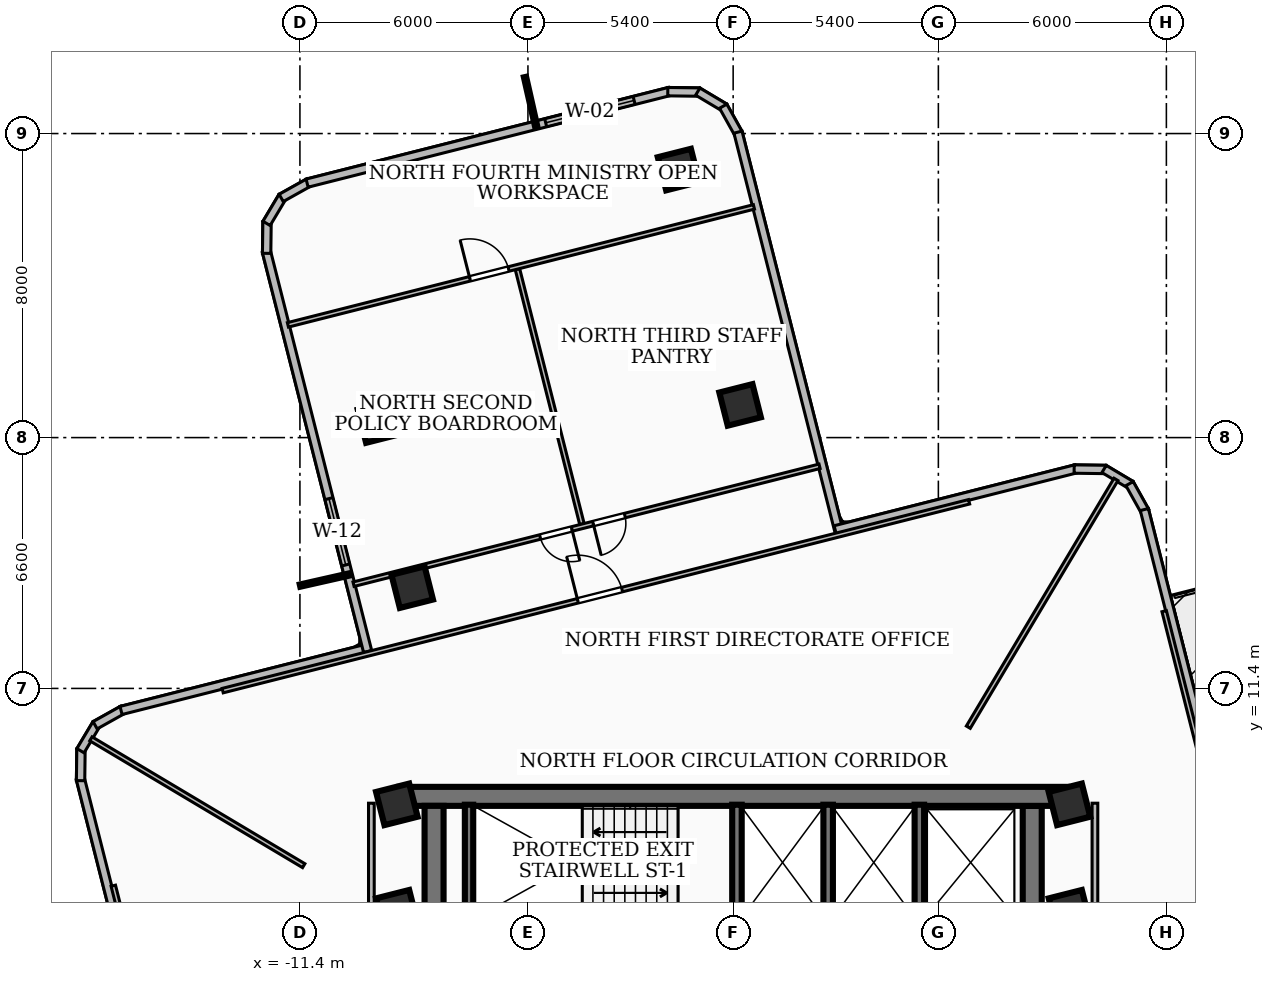
"""IFC4 building model, lengths in metres.
Left out: names, types, materials, properties, quantities, classifications, styles, units other than length and angle.
Written with IfcOpenShell. Run it as: python <this file> out.ifc"""

import sys

from ifc_helpers import new_model, si_unit, direction, frame, frame_2d, origin, origin_2d, place, context, subcontext, project, spatial, rectangle, extrude, element, fill, save


model = new_model("IFC4")
c1 = context("Model", 3, precision=1e-05, world=origin(), true_north=direction((0.0, 1.0)))
c2 = subcontext(c1, "Body", "Model", "MODEL_VIEW")
j1 = project(units=[si_unit("LENGTHUNIT", "METRE"), si_unit("PLANEANGLEUNIT", "RADIAN")], contexts=[c1])
p1 = place(None, origin())
s1 = spatial("IfcSite", under=j1, at=p1, CompositionType="ELEMENT")
p2 = place(p1, origin())
s2 = spatial("IfcBuilding", under=s1, at=p2, CompositionType="ELEMENT")
p3 = place(p2, frame((0.0, 0.0, 130.68)))
s3 = spatial("IfcBuildingStorey", under=s2, at=p3, CompositionType="ELEMENT", Elevation=130.68)
p4 = place(p3, frame((-8.78, 8.56, 0.0), z_axis=(0.0, 0.0, 1.0), x_axis=(1.0, 0.0, 0.0)))
e1 = element("IfcWall", 1, at=p4, inside=s3, PredefinedType="SHEAR", context=c2, shape_type="SweptSolid", body=[
    extrude(rectangle(XDim=17.56, YDim=0.5, at=frame_2d((8.78, 0.0))), origin(), (0.0, 0.0, 1.0), 3.32),
])
for number, where, z_axis, x_axis in (
    (2, (-7.87, 2.0, 0.0), (0.0, 0.0, 1.0), (0.0, 1.0, 0.0)),
    (3, (7.87, 8.31, 0.0), (0.0, 0.0, 1.0), (0.0, -1.0, 0.0)),
):
    element("IfcWall", number, at=place(p3, frame(where, z_axis=z_axis, x_axis=x_axis)), inside=s3, PredefinedType="SHEAR", context=c2, shape_type="SweptSolid", body=[
        extrude(rectangle(XDim=6.31, YDim=0.5, at=frame_2d((3.155, 0.0))), origin(), (0.0, 0.0, 1.0), 3.32),
    ])
p5 = place(p3, frame((-6.95, 5.28, 0.0), z_axis=(0.0, 0.0, 1.0), x_axis=(0.0, 1.0, 0.0)))
e4 = element("IfcWall", 4, at=p5, inside=s3, PredefinedType="SOLIDWALL", context=c2, shape_type="SweptSolid", body=[
    extrude(rectangle(XDim=3.06, YDim=0.22, at=frame_2d((1.53, 0.0))), origin(), (0.0, 0.0, 1.0), 3.32),
])
for number, where, z_axis, x_axis in (
    (5, (0.1, 5.3, 0.0), (0.0, 0.0, 1.0), (0.0, 1.0, 0.0)),
    (6, (2.5, 5.3, 0.0), (0.0, 0.0, 1.0), (0.0, 1.0, 0.0)),
    (7, (4.9, 5.3, 0.0), (0.0, 0.0, 1.0), (0.0, 1.0, 0.0)),
):
    element("IfcWall", number, at=place(p3, frame(where, z_axis=z_axis, x_axis=x_axis)), inside=s3, PredefinedType="SOLIDWALL", context=c2, shape_type="SweptSolid", body=[
        extrude(rectangle(XDim=3.04, YDim=0.25, at=frame_2d((1.52, 0.0))), origin(), (0.0, 0.0, 1.0), 3.32),
    ])
for number, where, z_axis, x_axis in (
    (8, (-8.85, 5.55, 0.0), (0.0, 0.0, 1.0), (0.969, 0.245, 0.0)),
    (9, (8.85, 5.55, 0.0), (0.0, 0.0, 1.0), (0.969, 0.245, 0.0)),
    (10, (-8.85, 8.35, 0.0), (0.0, 0.0, 1.0), (0.969, 0.245, 0.0)),
    (11, (8.85, 8.35, 0.0), (0.0, 0.0, 1.0), (0.969, 0.245, 0.0)),
    (12, (0.183, 18.86, 0.0), (0.0, 0.0, 1.0), (0.969, 0.245, 0.0)),
    (13, (-8.445, 14.064, 0.0), (0.0, 0.0, 1.0), (0.969, 0.245, 0.0)),
    (14, (-1.437, 25.052, 0.0), (0.0, 0.0, 1.0), (0.969, 0.245, 0.0)),
    (15, (-9.333, 18.409, 0.0), (0.0, 0.0, 1.0), (0.969, 0.245, 0.0)),
):
    element("IfcColumn", number, at=place(p3, frame(where, z_axis=z_axis, x_axis=x_axis)), inside=s3, PredefinedType="COLUMN", context=c2, shape_type="SweptSolid", body=[
        extrude(rectangle(XDim=0.9, YDim=0.9, at=origin_2d()), origin(), (0.0, 0.0, 1.0), 3.6),
    ])
p6 = place(p3, frame((-15.574, 2.684, 0.0), z_axis=(0.0, 0.0, 1.0), x_axis=(-0.245346347134, 0.969435490349, 0.0)))
e16 = element("IfcWall", 16, at=p6, inside=s3, PredefinedType="SOLIDWALL", context=c2, shape_type="SweptSolid", body=[
    extrude(rectangle(XDim=6.538, YDim=0.22, at=frame_2d((3.269, 0.0))), origin(), (0.0, 0.0, 1.0), 3.32),
])
p7 = place(p3, frame((-17.172, 8.973, 0.0), z_axis=(0.0, 0.0, 1.0), x_axis=(0.013464821393, 0.999909345183, 0.0)))
e17 = element("IfcWall", 17, at=p7, inside=s3, PredefinedType="SOLIDWALL", context=c2, shape_type="SweptSolid", body=[
    extrude(rectangle(XDim=0.834, YDim=0.22, at=frame_2d((0.417, 0.0))), origin(), (0.0, 0.0, 1.0), 3.32),
])
p8 = place(p3, frame((-17.174, 9.761, 0.0), z_axis=(0.0, 0.0, 1.0), x_axis=(0.512960801038, 0.858412031951, 0.0)))
e18 = element("IfcWall", 18, at=p8, inside=s3, PredefinedType="SOLIDWALL", context=c2, shape_type="SweptSolid", body=[
    extrude(rectangle(XDim=0.819, YDim=0.22, at=frame_2d((0.41, 0.0))), origin(), (0.0, 0.0, 1.0), 3.32),
])
p9 = place(p3, frame((-16.789, 10.431, 0.0), z_axis=(0.0, 0.0, 1.0), x_axis=(0.872870149311, 0.487952561671, 0.0)))
e19 = element("IfcWall", 19, at=p9, inside=s3, PredefinedType="SOLIDWALL", context=c2, shape_type="SweptSolid", body=[
    extrude(rectangle(XDim=0.834, YDim=0.22, at=frame_2d((0.417, 0.0))), origin(), (0.0, 0.0, 1.0), 3.32),
])
p10 = place(p3, frame((-16.107, 10.82, 0.0), z_axis=(0.0, 0.0, 1.0), x_axis=(0.969443674581, 0.245314006561, 0.0)))
e20 = element("IfcWall", 20, at=p10, inside=s3, PredefinedType="SOLIDWALL", context=c2, shape_type="SweptSolid", body=[
    extrude(rectangle(XDim=6.759, YDim=0.22, at=frame_2d((3.379, 0.0))), origin(), (0.0, 0.0, 1.0), 3.32),
])
p11 = place(p3, frame((-9.618, 12.371, 0.0), z_axis=(0.0, 0.0, 1.0), x_axis=(-0.245359810912, 0.969432082814, 0.0)))
e21 = element("IfcWall", 21, at=p11, inside=s3, PredefinedType="SOLIDWALL", context=c2, shape_type="SweptSolid", body=[
    extrude(rectangle(XDim=10.858, YDim=0.22, at=frame_2d((5.429, 0.0))), origin(), (0.0, 0.0, 1.0), 3.32),
])
p12 = place(p11, frame((2.35, 0.0, 0.85)))
e22 = element("IfcOpeningElement", 22, at=p12, cuts=e21, PredefinedType="OPENING", context=c2, shape_type="SweptSolid", body=[
    extrude(rectangle(XDim=1.8, YDim=1.6, at=frame_2d((0.9, 0.8))), frame((0.0, 0.12, 0.0), z_axis=(0.0, -1.0, 0.0), x_axis=(1.0, 0.0, 0.0)), (0.0, 0.0, 1.0), 0.24),
])
p13 = place(p3, frame((-12.276, 22.848, 0.0), z_axis=(0.0, 0.0, 1.0), x_axis=(0.013172159236, 0.999913243347, 0.0)))
e23 = element("IfcWall", 23, at=p13, inside=s3, PredefinedType="SOLIDWALL", context=c2, shape_type="SweptSolid", body=[
    extrude(rectangle(XDim=0.834, YDim=0.22, at=frame_2d((0.417, 0.0))), origin(), (0.0, 0.0, 1.0), 3.32),
])
p14 = place(p3, frame((-12.278, 23.636, 0.0), z_axis=(0.0, 0.0, 1.0), x_axis=(0.512960801038, 0.858412031951, 0.0)))
e24 = element("IfcWall", 24, at=p14, inside=s3, PredefinedType="SOLIDWALL", context=c2, shape_type="SweptSolid", body=[
    extrude(rectangle(XDim=0.819, YDim=0.22, at=frame_2d((0.41, 0.0))), origin(), (0.0, 0.0, 1.0), 3.32),
])
p15 = place(p3, frame((-11.893, 24.306, 0.0), z_axis=(0.0, 0.0, 1.0), x_axis=(0.872870149311, 0.487952561671, 0.0)))
e25 = element("IfcWall", 25, at=p15, inside=s3, PredefinedType="SOLIDWALL", context=c2, shape_type="SweptSolid", body=[
    extrude(rectangle(XDim=0.834, YDim=0.22, at=frame_2d((0.417, 0.0))), origin(), (0.0, 0.0, 1.0), 3.32),
])
p16 = place(p3, frame((-11.211, 24.695, 0.0), z_axis=(0.0, 0.0, 1.0), x_axis=(0.969473357826, 0.245196673032, 0.0)))
e26 = element("IfcWall", 26, at=p16, inside=s3, PredefinedType="SOLIDWALL", context=c2, shape_type="SweptSolid", body=[
    extrude(rectangle(XDim=9.84, YDim=0.22, at=frame_2d((4.92, 0.0))), origin(), (0.0, 0.0, 1.0), 3.32),
])
p17 = place(p16, frame((6.476, 0.0, 0.85)))
e27 = element("IfcOpeningElement", 27, at=p17, cuts=e26, PredefinedType="OPENING", context=c2, shape_type="SweptSolid", body=[
    extrude(rectangle(XDim=2.4, YDim=2.1, at=frame_2d((1.2, 1.05))), frame((0.0, 0.12, 0.0), z_axis=(0.0, -1.0, 0.0), x_axis=(1.0, 0.0, 0.0)), (0.0, 0.0, 1.0), 0.24),
])
p18 = place(p3, frame((-1.72, 27.102, 0.0), z_axis=(0.0, 0.0, 1.0), x_axis=(0.999913446142, -0.01315675587, 0.0)))
e28 = element("IfcWall", 28, at=p18, inside=s3, PredefinedType="SOLIDWALL", context=c2, shape_type="SweptSolid", body=[
    extrude(rectangle(XDim=0.835, YDim=0.22, at=frame_2d((0.417, 0.0))), origin(), (0.0, 0.0, 1.0), 3.32),
])
p19 = place(p3, frame((-0.931, 27.104, 0.0), z_axis=(0.0, 0.0, 1.0), x_axis=(0.858676543827, -0.512517895376, 0.0)))
e29 = element("IfcWall", 29, at=p19, inside=s3, PredefinedType="SOLIDWALL", context=c2, shape_type="SweptSolid", body=[
    extrude(rectangle(XDim=0.817, YDim=0.22, at=frame_2d((0.409, 0.0))), origin(), (0.0, 0.0, 1.0), 3.32),
])
p20 = place(p3, frame((-0.262, 26.72, 0.0), z_axis=(0.0, 0.0, 1.0), x_axis=(0.487454303052, -0.873148499647, 0.0)))
e30 = element("IfcWall", 30, at=p20, inside=s3, PredefinedType="SOLIDWALL", context=c2, shape_type="SweptSolid", body=[
    extrude(rectangle(XDim=0.835, YDim=0.22, at=frame_2d((0.417, 0.0))), origin(), (0.0, 0.0, 1.0), 3.32),
])
p21 = place(p3, frame((0.127, 26.037, 0.0), z_axis=(0.0, 0.0, 1.0), x_axis=(0.245354462674, -0.969433436418, 0.0)))
e31 = element("IfcWall", 31, at=p21, inside=s3, PredefinedType="SOLIDWALL", context=c2, shape_type="SweptSolid", body=[
    extrude(rectangle(XDim=10.858, YDim=0.22, at=frame_2d((5.429, 0.0))), origin(), (0.0, 0.0, 1.0), 2.55),
])
p22 = place(p3, frame((2.684, 15.574, 0.0), z_axis=(0.0, 0.0, 1.0), x_axis=(0.969435490349, 0.245346347134, 0.0)))
e32 = element("IfcWall", 32, at=p22, inside=s3, PredefinedType="SOLIDWALL", context=c2, shape_type="SweptSolid", body=[
    extrude(rectangle(XDim=6.538, YDim=0.22, at=frame_2d((3.269, 0.0))), origin(), (0.0, 0.0, 1.0), 2.55),
])
p23 = place(p3, frame((8.973, 17.172, 0.0), z_axis=(0.0, 0.0, 1.0), x_axis=(0.999909345183, -0.013464821393, 0.0)))
e33 = element("IfcWall", 33, at=p23, inside=s3, PredefinedType="SOLIDWALL", context=c2, shape_type="SweptSolid", body=[
    extrude(rectangle(XDim=0.834, YDim=0.22, at=frame_2d((0.417, 0.0))), origin(), (0.0, 0.0, 1.0), 3.32),
])
p24 = place(p3, frame((9.761, 17.174, 0.0), z_axis=(0.0, 0.0, 1.0), x_axis=(0.858412031951, -0.512960801038, 0.0)))
e34 = element("IfcWall", 34, at=p24, inside=s3, PredefinedType="SOLIDWALL", context=c2, shape_type="SweptSolid", body=[
    extrude(rectangle(XDim=0.819, YDim=0.22, at=frame_2d((0.41, 0.0))), origin(), (0.0, 0.0, 1.0), 3.32),
])
p25 = place(p3, frame((10.431, 16.789, 0.0), z_axis=(0.0, 0.0, 1.0), x_axis=(0.487952561671, -0.872870149311, 0.0)))
e35 = element("IfcWall", 35, at=p25, inside=s3, PredefinedType="SOLIDWALL", context=c2, shape_type="SweptSolid", body=[
    extrude(rectangle(XDim=0.834, YDim=0.22, at=frame_2d((0.417, 0.0))), origin(), (0.0, 0.0, 1.0), 3.32),
])
p26 = place(p3, frame((10.82, 16.107, 0.0), z_axis=(0.0, 0.0, 1.0), x_axis=(0.245314006561, -0.969443674581, 0.0)))
e36 = element("IfcWall", 36, at=p26, inside=s3, PredefinedType="SOLIDWALL", context=c2, shape_type="SweptSolid", body=[
    extrude(rectangle(XDim=6.759, YDim=0.22, at=frame_2d((3.379, 0.0))), origin(), (0.0, 0.0, 1.0), 3.32),
])
for number, where, z_axis, x_axis in (
    (37, (-9.52, 1.75, 0.0), (0.0, 0.0, 1.0), (0.0, 1.0, 0.0)),
    (38, (9.52, 1.75, 0.0), (0.0, 0.0, 1.0), (0.0, 1.0, 0.0)),
):
    element("IfcWall", number, at=place(p3, frame(where, z_axis=z_axis, x_axis=x_axis)), inside=s3, PredefinedType="PARTITIONING", context=c2, shape_type="SweptSolid", body=[
        extrude(rectangle(XDim=6.63, YDim=0.15, at=frame_2d((3.315, 0.0))), origin(), (0.0, 0.0, 1.0), 2.55),
    ])
p27 = place(p3, frame((6.188, 10.38, 0.0), z_axis=(0.0, 0.0, 1.0), x_axis=(0.511972353143, 0.859001926434, 0.0)))
e39 = element("IfcWall", 39, at=p27, inside=s3, PredefinedType="PARTITIONING", context=c2, shape_type="SweptSolid", body=[
    extrude(rectangle(XDim=7.59, YDim=0.12, at=frame_2d((3.795, 0.0))), origin(), (0.0, 0.0, 1.0), 2.55),
])
p28 = place(p3, frame((-11.3, 6.736, 0.0), z_axis=(0.0, 0.0, 1.0), x_axis=(-0.858979599017, 0.512009812868, 0.0)))
e40 = element("IfcWall", 40, at=p28, inside=s3, PredefinedType="PARTITIONING", context=c2, shape_type="SweptSolid", body=[
    extrude(rectangle(XDim=6.519, YDim=0.12, at=frame_2d((3.26, 0.0))), origin(), (0.0, 0.0, 1.0), 3.32),
])
p29 = place(p3, frame((11.342, 13.433, 0.0), z_axis=(0.0, 0.0, 1.0), x_axis=(0.24525085526, -0.969459652587, 0.0)))
e41 = element("IfcWall", 41, at=p29, inside=s3, PredefinedType="PARTITIONING", context=c2, shape_type="SweptSolid", body=[
    extrude(rectangle(XDim=20.261, YDim=0.12, at=frame_2d((10.13, 0.0))), origin(), (0.0, 0.0, 1.0), 2.55),
])
p30 = place(p29, frame((9.64, 0.0, 0.0)))
e42 = element("IfcOpeningElement", 42, at=p30, cuts=e41, PredefinedType="OPENING", context=c2, shape_type="SweptSolid", body=[
    extrude(rectangle(XDim=1.2, YDim=2.1, at=frame_2d((0.6, 1.05))), frame((0.0, 0.07, 0.0), z_axis=(0.0, -1.0, 0.0), x_axis=(1.0, 0.0, 0.0)), (0.0, 0.0, 1.0), 0.14),
])
p31 = place(p3, frame((-13.433, 11.342, 0.0), z_axis=(0.0, 0.0, 1.0), x_axis=(0.969459652587, 0.24525085526, 0.0)))
e43 = element("IfcWall", 43, at=p31, inside=s3, PredefinedType="PARTITIONING", context=c2, shape_type="SweptSolid", body=[
    extrude(rectangle(XDim=20.261, YDim=0.12, at=frame_2d((10.13, 0.0))), origin(), (0.0, 0.0, 1.0), 2.55),
])
p32 = place(p31, frame((9.64, 0.0, 0.0)))
e44 = element("IfcOpeningElement", 44, at=p32, cuts=e43, PredefinedType="OPENING", context=c2, shape_type="SweptSolid", body=[
    extrude(rectangle(XDim=1.2, YDim=2.1, at=frame_2d((0.6, 1.05))), frame((0.0, 0.07, 0.0), z_axis=(0.0, -1.0, 0.0), x_axis=(1.0, 0.0, 0.0)), (0.0, 0.0, 1.0), 0.14),
])
p33 = place(p3, frame((-3.979, 15.724, 0.0), z_axis=(0.0, 0.0, 1.0), x_axis=(-0.245224196517, 0.969466396242, 0.0)))
e45 = element("IfcWall", 45, at=p33, inside=s3, PredefinedType="PARTITIONING", context=c2, shape_type="SweptSolid", body=[
    extrude(rectangle(XDim=6.92, YDim=0.12, at=frame_2d((3.46, 0.0))), origin(), (0.0, 0.0, 1.0), 2.7),
])
p34 = place(p3, frame((2.274, 17.245, 0.0), z_axis=(0.0, 0.0, 1.0), x_axis=(-0.969444849394, -0.24530936383, 0.0)))
e46 = element("IfcWall", 46, at=p34, inside=s3, PredefinedType="PARTITIONING", context=c2, shape_type="SweptSolid", body=[
    extrude(rectangle(XDim=12.649, YDim=0.12, at=frame_2d((6.325, 0.0))), origin(), (0.0, 0.0, 1.0), 2.55),
])
p35 = place(p34, frame((5.285, 0.0, 0.0)))
e47 = element("IfcOpeningElement", 47, at=p35, cuts=e46, PredefinedType="OPENING", context=c2, shape_type="SweptSolid", body=[
    extrude(rectangle(XDim=0.86, YDim=2.04, at=frame_2d((0.43, 1.02))), frame((0.0, 0.07, 0.0), z_axis=(0.0, -1.0, 0.0), x_axis=(1.0, 0.0, 0.0)), (0.0, 0.0, 1.0), 0.14),
])
p36 = place(p34, frame((6.725, 0.0, 0.0)))
e48 = element("IfcOpeningElement", 48, at=p36, cuts=e46, PredefinedType="OPENING", context=c2, shape_type="SweptSolid", body=[
    extrude(rectangle(XDim=0.86, YDim=2.04, at=frame_2d((0.43, 1.02))), frame((0.0, 0.07, 0.0), z_axis=(0.0, -1.0, 0.0), x_axis=(1.0, 0.0, 0.0)), (0.0, 0.0, 1.0), 0.14),
])
p37 = place(p3, frame((-11.716, 20.966, 0.0), z_axis=(0.0, 0.0, 1.0), x_axis=(0.96942764939, 0.245377326983, 0.0)))
e49 = element("IfcWall", 49, at=p37, inside=s3, PredefinedType="PARTITIONING", context=c2, shape_type="SweptSolid", body=[
    extrude(rectangle(XDim=12.65, YDim=0.12, at=frame_2d((6.325, 0.0))), origin(), (0.0, 0.0, 1.0), 2.55),
])
p38 = place(p37, frame((4.94, 0.0, 0.0)))
e50 = element("IfcOpeningElement", 50, at=p38, cuts=e49, PredefinedType="OPENING", context=c2, shape_type="SweptSolid", body=[
    extrude(rectangle(XDim=1.05, YDim=2.08, at=frame_2d((0.525, 1.04))), frame((0.0, 0.07, 0.0), z_axis=(0.0, -1.0, 0.0), x_axis=(1.0, 0.0, 0.0)), (0.0, 0.0, 1.0), 0.14),
])
p39 = place(p3, frame((-11.342, -13.433, 0.0), z_axis=(0.0, 0.0, 1.0), x_axis=(-0.24525085526, 0.969459652587, 0.0)))
e51 = element("IfcWall", 51, at=p39, inside=s3, PredefinedType="PARTITIONING", context=c2, shape_type="SweptSolid", body=[
    extrude(rectangle(XDim=20.261, YDim=0.12, at=frame_2d((10.13, 0.0))), origin(), (0.0, 0.0, 1.0), 2.55),
])
p40 = place(p39, frame((9.64, 0.0, 0.0)))
e52 = element("IfcOpeningElement", 52, at=p40, cuts=e51, PredefinedType="OPENING", context=c2, shape_type="SweptSolid", body=[
    extrude(rectangle(XDim=1.2, YDim=2.1, at=frame_2d((0.6, 1.05))), frame((0.0, 0.07, 0.0), z_axis=(0.0, -1.0, 0.0), x_axis=(1.0, 0.0, 0.0)), (0.0, 0.0, 1.0), 0.14),
])
p41 = place(p12, origin())
e53 = element("IfcWindow", 53, at=p41, inside=s3, PartitioningType="SINGLE_PANEL", PredefinedType="WINDOW", context=c2, shape_type="SweptSolid", body=[
    extrude(rectangle(XDim=1.8, YDim=1.6, at=frame_2d((0.9, 0.8))), frame((0.0, 0.03, 0.0), z_axis=(0.0, -1.0, 0.0), x_axis=(1.0, 0.0, 0.0)), (0.0, 0.0, 1.0), 0.06),
])
fill(e22, e53)
p42 = place(p17, origin())
e54 = element("IfcWindow", 54, at=p42, inside=s3, PartitioningType="SINGLE_PANEL", PredefinedType="WINDOW", context=c2, shape_type="SweptSolid", body=[
    extrude(rectangle(XDim=2.4, YDim=2.1, at=frame_2d((1.2, 1.05))), frame((0.0, 0.03, 0.0), z_axis=(0.0, -1.0, 0.0), x_axis=(1.0, 0.0, 0.0)), (0.0, 0.0, 1.0), 0.06),
])
fill(e27, e54)
p43 = place(p32, origin())
e55 = element("IfcDoor", 55, at=p43, inside=s3, OperationType="SINGLE_SWING_LEFT", PredefinedType="DOOR", context=c2, shape_type="SweptSolid", body=[
    extrude(rectangle(XDim=1.2, YDim=2.1, at=frame_2d((0.6, 1.05))), frame((0.0, 0.025, 0.0), z_axis=(0.0, -1.0, 0.0), x_axis=(1.0, 0.0, 0.0)), (0.0, 0.0, 1.0), 0.05),
])
fill(e44, e55)
p44 = place(p35, origin())
e56 = element("IfcDoor", 56, at=p44, inside=s3, OperationType="SINGLE_SWING_RIGHT", PredefinedType="DOOR", context=c2, shape_type="SweptSolid", body=[
    extrude(rectangle(XDim=0.86, YDim=2.04, at=frame_2d((0.43, 1.02))), frame((0.0, 0.025, 0.0), z_axis=(0.0, -1.0, 0.0), x_axis=(1.0, 0.0, 0.0)), (0.0, 0.0, 1.0), 0.05),
])
fill(e47, e56)
p45 = place(p36, origin())
e57 = element("IfcDoor", 57, at=p45, inside=s3, OperationType="SINGLE_SWING_LEFT", PredefinedType="DOOR", context=c2, shape_type="SweptSolid", body=[
    extrude(rectangle(XDim=0.86, YDim=2.04, at=frame_2d((0.43, 1.02))), frame((0.0, 0.025, 0.0), z_axis=(0.0, -1.0, 0.0), x_axis=(1.0, 0.0, 0.0)), (0.0, 0.0, 1.0), 0.05),
])
fill(e48, e57)
p46 = place(p38, origin())
e58 = element("IfcDoor", 58, at=p46, inside=s3, OperationType="SINGLE_SWING_LEFT", PredefinedType="DOOR", context=c2, shape_type="SweptSolid", body=[
    extrude(rectangle(XDim=1.05, YDim=2.08, at=frame_2d((0.525, 1.04))), frame((0.0, 0.025, 0.0), z_axis=(0.0, -1.0, 0.0), x_axis=(1.0, 0.0, 0.0)), (0.0, 0.0, 1.0), 0.05),
])
fill(e50, e58)
save(model, sys.argv[1])
